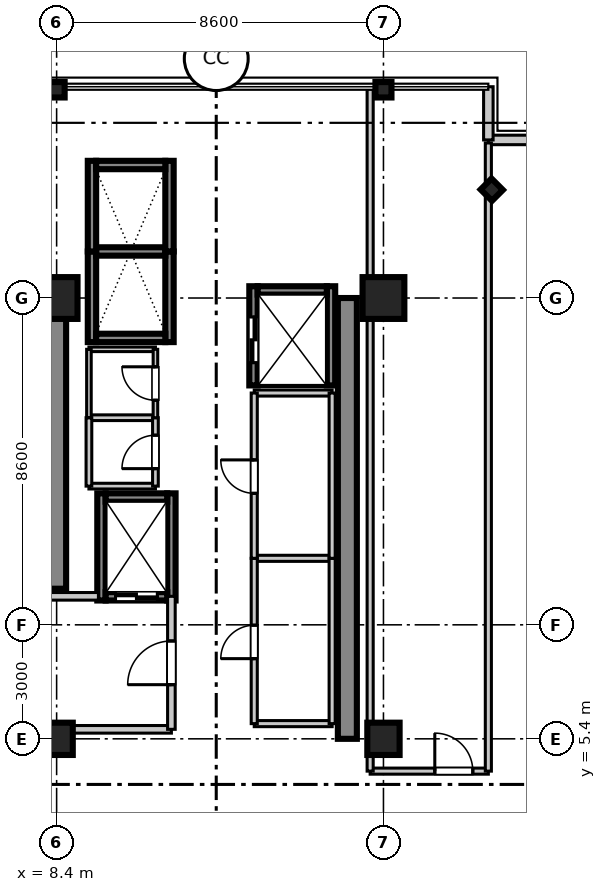
"""IFC4 building model, lengths in metres.
Left out: names, types, materials, properties, quantities, classifications, styles, units other than length and angle.
Written with IfcOpenShell. Run it as: python <this file> out.ifc"""

import sys

from ifc_helpers import new_model, si_unit, direction, frame, frame_2d, origin, origin_2d, place, context, subcontext, project, spatial, rectangle, i_section, extrude, source, transform, mapped, element, fill, save


model = new_model("IFC4")
c1 = context("Model", 3, precision=1e-05, world=origin(), true_north=direction((0.0, 1.0)))
c2 = subcontext(c1, "Body", "Model", "MODEL_VIEW")
j1 = project(units=[si_unit("LENGTHUNIT", "METRE"), si_unit("PLANEANGLEUNIT", "RADIAN")], contexts=[c1])
p1 = place(None, origin())
s1 = spatial("IfcSite", under=j1, at=p1, CompositionType="ELEMENT")
p2 = place(p1, origin())
s2 = spatial("IfcBuilding", under=s1, at=p2, CompositionType="ELEMENT")
p3 = place(p2, frame((0.0, 0.0, 163.6)))
s3 = spatial("IfcBuildingStorey", under=s2, at=p3, CompositionType="ELEMENT", Elevation=163.6)
m1 = source(origin(), c2, "Body", "SweptSolid", [
    extrude(rectangle(XDim=0.85, YDim=0.85, at=origin_2d()), origin(), (0.0, 0.0, 1.0), 3.605),
])
p4 = place(p3, frame((8.4, 5.4, 0.0), z_axis=(0.0, 0.0, 1.0), x_axis=(1.0, 0.0, 0.0)))
e1 = element("IfcColumn", 1, at=p4, inside=s3, PredefinedType="PILASTER", context=c2, shape_type="MappedRepresentation", body=[
    mapped(m1, transform((0.0, 0.0, 0.0), scale=1.0)),
])
m2 = source(origin(), c2, "Body", "SweptSolid", [
    extrude(rectangle(XDim=1.1, YDim=1.1, at=origin_2d()), origin(), (0.0, 0.0, 1.0), 3.605),
])
p5 = place(p3, frame((8.4, 17.0, 0.0), z_axis=(0.0, 0.0, 1.0), x_axis=(1.0, 0.0, 0.0)))
e2 = element("IfcColumn", 2, at=p5, inside=s3, PredefinedType="COLUMN", context=c2, shape_type="MappedRepresentation", body=[
    mapped(m2, transform((0.0, 0.0, 0.0), scale=1.0)),
])
p6 = place(p3, frame((17.0, 5.4, 0.0), z_axis=(0.0, 0.0, 1.0), x_axis=(1.0, 0.0, 0.0)))
e3 = element("IfcColumn", 3, at=p6, inside=s3, PredefinedType="PILASTER", context=c2, shape_type="MappedRepresentation", body=[
    mapped(m1, transform((0.0, 0.0, 0.0), scale=1.0)),
])
p7 = place(p3, frame((17.0, 17.0, 0.0), z_axis=(0.0, 0.0, 1.0), x_axis=(1.0, 0.0, 0.0)))
e4 = element("IfcColumn", 4, at=p7, inside=s3, PredefinedType="COLUMN", context=c2, shape_type="MappedRepresentation", body=[
    mapped(m2, transform((0.0, 0.0, 0.0), scale=1.0)),
])
m3 = source(origin(), c2, "Body", "SweptSolid", [
    extrude(i_section(OverallWidth=0.406, OverallDepth=0.422, WebThickness=0.019, FlangeThickness=0.03, at=origin_2d()), origin(), (0.0, 0.0, 1.0), 3.605),
])
for number, where, z_axis, x_axis in (
    (5, (8.4, 22.48, 0.0), (0.0, 0.0, 1.0), (0.0, 1.0, 0.0)),
    (6, (17.0, 22.48, 0.0), (0.0, 0.0, 1.0), (0.0, 1.0, 0.0)),
    (7, (19.85, 19.85, 0.0), (0.0, 0.0, 1.0), (0.707, 0.707, 0.0)),
):
    element("IfcColumn", number, at=place(p3, frame(where, z_axis=z_axis, x_axis=x_axis)), inside=s3, PredefinedType="COLUMN", context=c2, shape_type="MappedRepresentation", body=[
        mapped(m3, transform((0.0, 0.0, 0.0), scale=1.0)),
    ])
m4 = source(origin(), c2, "Body", "SweptSolid", [
    extrude(rectangle(XDim=7.65, YDim=0.5, at=frame_2d((3.825, 0.0))), origin(), (0.0, 0.0, 1.0), 3.39),
])
p8 = place(p3, frame((8.4, 9.35, 0.0), z_axis=(0.0, 0.0, 1.0), x_axis=(0.0, 1.0, 0.0)))
e8 = element("IfcWall", 8, at=p8, inside=s3, PredefinedType="SHEAR", context=c2, shape_type="MappedRepresentation", body=[
    mapped(m4, transform((0.0, 0.0, 0.0), scale=1.0)),
])
m5 = source(origin(), c2, "Body", "SweptSolid", [
    extrude(rectangle(XDim=11.6, YDim=0.5, at=frame_2d((5.8, 0.0))), origin(), (0.0, 0.0, 1.0), 3.39),
])
p9 = place(p3, frame((16.05, 5.4, 0.0), z_axis=(0.0, 0.0, 1.0), x_axis=(0.0, 1.0, 0.0)))
e9 = element("IfcWall", 9, at=p9, inside=s3, PredefinedType="SHEAR", context=c2, shape_type="MappedRepresentation", body=[
    mapped(m5, transform((0.0, 0.0, 0.0), scale=1.0)),
])
m6 = source(origin(), c2, "Body", "SweptSolid", [
    extrude(rectangle(XDim=2.385, YDim=0.22, at=frame_2d((1.192, 0.0))), origin(), (0.0, 0.0, 1.0), 3.39),
])
for number, where, z_axis, x_axis in (
    (10, (9.33, 15.84, 0.0), (0.0, 0.0, 1.0), (0.0, 1.0, 0.0)),
    (11, (11.37, 15.84, 0.0), (0.0, 0.0, 1.0), (0.0, 1.0, 0.0)),
):
    element("IfcWall", number, at=place(p3, frame(where, z_axis=z_axis, x_axis=x_axis)), inside=s3, PredefinedType="SHEAR", context=c2, shape_type="MappedRepresentation", body=[
        mapped(m6, transform((0.0, 0.0, 0.0), scale=1.0)),
    ])
m7 = source(origin(), c2, "Body", "SweptSolid", [
    extrude(rectangle(XDim=1.82, YDim=0.22, at=frame_2d((0.91, 0.0))), origin(), (0.0, 0.0, 1.0), 3.39),
])
p10 = place(p3, frame((9.44, 15.95, 0.0), z_axis=(0.0, 0.0, 1.0), x_axis=(1.0, 0.0, 0.0)))
e12 = element("IfcWall", 12, at=p10, inside=s3, PredefinedType="SHEAR", context=c2, shape_type="MappedRepresentation", body=[
    mapped(m7, transform((0.0, 0.0, 0.0), scale=1.0)),
])
m8 = source(origin(), c2, "Body", "SweptSolid", [
    extrude(rectangle(XDim=1.82, YDim=0.22, at=frame_2d((0.91, 0.0))), origin(), (0.0, 0.0, 1.0), 3.65),
])
p11 = place(p3, frame((9.44, 18.225, 0.0), z_axis=(0.0, 0.0, 1.0), x_axis=(1.0, 0.0, 0.0)))
e13 = element("IfcWall", 13, at=p11, inside=s3, PredefinedType="SHEAR", context=c2, shape_type="MappedRepresentation", body=[
    mapped(m8, transform((0.0, 0.0, 0.0), scale=1.0)),
])
for number, where, z_axis, x_axis in (
    (14, (9.33, 18.225, 0.0), (0.0, 0.0, 1.0), (0.0, 1.0, 0.0)),
    (15, (11.37, 18.225, 0.0), (0.0, 0.0, 1.0), (0.0, 1.0, 0.0)),
):
    element("IfcWall", number, at=place(p3, frame(where, z_axis=z_axis, x_axis=x_axis)), inside=s3, PredefinedType="SHEAR", context=c2, shape_type="MappedRepresentation", body=[
        mapped(m6, transform((0.0, 0.0, 0.0), scale=1.0)),
    ])
p12 = place(p3, frame((9.44, 20.5, 0.0), z_axis=(0.0, 0.0, 1.0), x_axis=(1.0, 0.0, 0.0)))
e16 = element("IfcWall", 16, at=p12, inside=s3, PredefinedType="SHEAR", context=c2, shape_type="MappedRepresentation", body=[
    mapped(m7, transform((0.0, 0.0, 0.0), scale=1.0)),
])
m9 = source(origin(), c2, "Body", "SweptSolid", [
    extrude(rectangle(XDim=2.82, YDim=0.22, at=frame_2d((1.41, 0.0))), origin(), (0.0, 0.0, 1.0), 3.39),
])
for number, where, z_axis, x_axis in (
    (17, (9.58, 9.04, 0.0), (0.0, 0.0, 1.0), (0.0, 1.0, 0.0)),
    (18, (11.42, 9.04, 0.0), (0.0, 0.0, 1.0), (0.0, 1.0, 0.0)),
):
    element("IfcWall", number, at=place(p3, frame(where, z_axis=z_axis, x_axis=x_axis)), inside=s3, PredefinedType="SHEAR", context=c2, shape_type="MappedRepresentation", body=[
        mapped(m9, transform((0.0, 0.0, 0.0), scale=1.0)),
    ])
m10 = source(origin(), c2, "Body", "SweptSolid", [
    extrude(rectangle(XDim=1.62, YDim=0.22, at=frame_2d((0.81, 0.0))), origin(), (0.0, 0.0, 1.0), 3.39),
])
p13 = place(p3, frame((9.69, 9.15, 0.0), z_axis=(0.0, 0.0, 1.0), x_axis=(1.0, 0.0, 0.0)))
e19 = element("IfcWall", 19, at=p13, inside=s3, PredefinedType="SHEAR", context=c2, shape_type="MappedRepresentation", body=[
    mapped(m10, transform((0.0, 0.0, 0.0), scale=1.0)),
])
p14 = place(p13, frame((0.26, 0.0, 0.0)))
e20 = element("IfcOpeningElement", 20, at=p14, cuts=e19, PredefinedType="OPENING", context=c2, shape_type="SweptSolid", body=[
    extrude(rectangle(XDim=1.1, YDim=2.2, at=frame_2d((0.55, 1.1))), frame((0.0, 0.12, 0.0), z_axis=(0.0, -1.0, 0.0), x_axis=(1.0, 0.0, 0.0)), (0.0, 0.0, 1.0), 0.24),
])
p15 = place(p3, frame((9.69, 11.75, 0.0), z_axis=(0.0, 0.0, 1.0), x_axis=(1.0, 0.0, 0.0)))
e21 = element("IfcWall", 21, at=p15, inside=s3, PredefinedType="SHEAR", context=c2, shape_type="MappedRepresentation", body=[
    mapped(m10, transform((0.0, 0.0, 0.0), scale=1.0)),
])
m11 = source(origin(), c2, "Body", "SweptSolid", [
    extrude(rectangle(XDim=2.61, YDim=0.22, at=frame_2d((1.305, 0.0))), origin(), (0.0, 0.0, 1.0), 3.39),
])
p16 = place(p3, frame((13.58, 14.7, 0.0), z_axis=(0.0, 0.0, 1.0), x_axis=(0.0, 1.0, 0.0)))
e22 = element("IfcWall", 22, at=p16, inside=s3, PredefinedType="SHEAR", context=c2, shape_type="MappedRepresentation", body=[
    mapped(m11, transform((0.0, 0.0, 0.0), scale=1.0)),
])
p17 = place(p16, frame((0.6, 0.0, 0.0)))
e23 = element("IfcOpeningElement", 23, at=p17, cuts=e22, PredefinedType="OPENING", context=c2, shape_type="SweptSolid", body=[
    extrude(rectangle(XDim=1.2, YDim=2.2, at=frame_2d((0.6, 1.1))), frame((0.0, 0.12, 0.0), z_axis=(0.0, -1.0, 0.0), x_axis=(1.0, 0.0, 0.0)), (0.0, 0.0, 1.0), 0.24),
])
p18 = place(p3, frame((15.62, 14.7, 0.0), z_axis=(0.0, 0.0, 1.0), x_axis=(0.0, 1.0, 0.0)))
e24 = element("IfcWall", 24, at=p18, inside=s3, PredefinedType="SHEAR", context=c2, shape_type="MappedRepresentation", body=[
    mapped(m11, transform((0.0, 0.0, 0.0), scale=1.0)),
])
p19 = place(p3, frame((13.69, 17.2, 0.0), z_axis=(0.0, 0.0, 1.0), x_axis=(1.0, 0.0, 0.0)))
e25 = element("IfcWall", 25, at=p19, inside=s3, PredefinedType="SHEAR", context=c2, shape_type="MappedRepresentation", body=[
    mapped(m7, transform((0.0, 0.0, 0.0), scale=1.0)),
])
m12 = source(origin(), c2, "Body", "SweptSolid", [
    extrude(rectangle(XDim=1.4, YDim=0.25, at=frame_2d((0.7, 0.0))), origin(), (0.0, 0.0, 1.0), 3.39),
])
p20 = place(p3, frame((19.76, 21.16, 0.0), z_axis=(0.0, 0.0, 1.0), x_axis=(1.0, 0.0, 0.0)))
e26 = element("IfcWall", 26, at=p20, inside=s3, PredefinedType="STANDARD", context=c2, shape_type="MappedRepresentation", body=[
    mapped(m12, transform((0.0, 0.0, 0.0), scale=1.0)),
])
m13 = source(origin(), c2, "Body", "SweptSolid", [
    extrude(rectangle(XDim=1.4, YDim=0.25, at=frame_2d((0.7, 0.0))), origin(), (0.0, 0.0, 1.0), 3.39),
])
p21 = place(p3, frame((19.76, 21.16, 0.0), z_axis=(0.0, 0.0, 1.0), x_axis=(0.0, 1.0, 0.0)))
e27 = element("IfcWall", 27, at=p21, inside=s3, PredefinedType="STANDARD", context=c2, shape_type="MappedRepresentation", body=[
    mapped(m13, transform((0.0, 0.0, 0.0), scale=1.0)),
])
m14 = source(origin(), c2, "Body", "SweptSolid", [
    extrude(rectangle(XDim=3.82, YDim=0.2, at=frame_2d((1.91, 0.0))), origin(), (0.0, 0.0, 1.0), 2.73),
])
p22 = place(p3, frame((7.6, 5.65, 0.0), z_axis=(0.0, 0.0, 1.0), x_axis=(1.0, 0.0, 0.0)))
e28 = element("IfcWall", 28, at=p22, inside=s3, PredefinedType="PARTITIONING", context=c2, shape_type="MappedRepresentation", body=[
    mapped(m14, transform((0.0, 0.0, 0.0), scale=1.0)),
])
m15 = source(origin(), c2, "Body", "SweptSolid", [
    extrude(rectangle(XDim=1.9, YDim=0.2, at=frame_2d((0.95, 0.0))), origin(), (0.0, 0.0, 1.0), 2.73),
])
p23 = place(p3, frame((7.6, 9.15, 0.0), z_axis=(0.0, 0.0, 1.0), x_axis=(1.0, 0.0, 0.0)))
e29 = element("IfcWall", 29, at=p23, inside=s3, PredefinedType="PARTITIONING", context=c2, shape_type="MappedRepresentation", body=[
    mapped(m15, transform((0.0, 0.0, 0.0), scale=1.0)),
])
m16 = source(origin(), c2, "Body", "SweptSolid", [
    extrude(rectangle(XDim=3.5, YDim=0.2, at=frame_2d((1.75, 0.0))), origin(), (0.0, 0.0, 1.0), 2.73),
])
p24 = place(p3, frame((11.42, 5.65, 0.0), z_axis=(0.0, 0.0, 1.0), x_axis=(0.0, 1.0, 0.0)))
e30 = element("IfcWall", 30, at=p24, inside=s3, PredefinedType="PARTITIONING", context=c2, shape_type="MappedRepresentation", body=[
    mapped(m16, transform((0.0, 0.0, 0.0), scale=1.0)),
])
p25 = place(p24, frame((1.175, 0.0, 0.0)))
e31 = element("IfcOpeningElement", 31, at=p25, cuts=e30, PredefinedType="OPENING", context=c2, shape_type="SweptSolid", body=[
    extrude(rectangle(XDim=1.15, YDim=2.15, at=frame_2d((0.575, 1.075))), frame((0.0, 0.11, 0.0), z_axis=(0.0, -1.0, 0.0), x_axis=(1.0, 0.0, 0.0)), (0.0, 0.0, 1.0), 0.22),
])
m17 = source(origin(), c2, "Body", "SweptSolid", [
    extrude(rectangle(XDim=1.75, YDim=0.15, at=frame_2d((0.875, 0.0))), origin(), (0.0, 0.0, 1.0), 2.73),
])
for number, where, z_axis, x_axis in (
    (32, (9.25, 12.05, 0.0), (0.0, 0.0, 1.0), (1.0, 0.0, 0.0)),
    (33, (9.25, 13.85, 0.0), (0.0, 0.0, 1.0), (1.0, 0.0, 0.0)),
):
    element("IfcWall", number, at=place(p3, frame(where, z_axis=z_axis, x_axis=x_axis)), inside=s3, PredefinedType="PARTITIONING", context=c2, shape_type="MappedRepresentation", body=[
        mapped(m17, transform((0.0, 0.0, 0.0), scale=1.0)),
    ])
m18 = source(origin(), c2, "Body", "SweptSolid", [
    extrude(rectangle(XDim=1.8, YDim=0.15, at=frame_2d((0.9, 0.0))), origin(), (0.0, 0.0, 1.0), 2.73),
])
p26 = place(p3, frame((9.25, 12.05, 0.0), z_axis=(0.0, 0.0, 1.0), x_axis=(0.0, 1.0, 0.0)))
e34 = element("IfcWall", 34, at=p26, inside=s3, PredefinedType="PARTITIONING", context=c2, shape_type="MappedRepresentation", body=[
    mapped(m18, transform((0.0, 0.0, 0.0), scale=1.0)),
])
p27 = place(p3, frame((11.0, 12.05, 0.0), z_axis=(0.0, 0.0, 1.0), x_axis=(0.0, 1.0, 0.0)))
e35 = element("IfcWall", 35, at=p27, inside=s3, PredefinedType="PARTITIONING", context=c2, shape_type="MappedRepresentation", body=[
    mapped(m18, transform((0.0, 0.0, 0.0), scale=1.0)),
])
p28 = place(p27, frame((0.46, 0.0, 0.0)))
e36 = element("IfcOpeningElement", 36, at=p28, cuts=e35, PredefinedType="OPENING", context=c2, shape_type="SweptSolid", body=[
    extrude(rectangle(XDim=0.88, YDim=2.1, at=frame_2d((0.44, 1.05))), frame((0.0, 0.085, 0.0), z_axis=(0.0, -1.0, 0.0), x_axis=(1.0, 0.0, 0.0)), (0.0, 0.0, 1.0), 0.17),
])
m19 = source(origin(), c2, "Body", "SweptSolid", [
    extrude(rectangle(XDim=1.75, YDim=0.12, at=frame_2d((0.875, 0.0))), origin(), (0.0, 0.0, 1.0), 2.73),
])
p29 = place(p3, frame((9.25, 15.65, 0.0), z_axis=(0.0, 0.0, 1.0), x_axis=(1.0, 0.0, 0.0)))
e37 = element("IfcWall", 37, at=p29, inside=s3, PredefinedType="PARTITIONING", context=c2, shape_type="MappedRepresentation", body=[
    mapped(m19, transform((0.0, 0.0, 0.0), scale=1.0)),
])
m20 = source(origin(), c2, "Body", "SweptSolid", [
    extrude(rectangle(XDim=1.8, YDim=0.12, at=frame_2d((0.9, 0.0))), origin(), (0.0, 0.0, 1.0), 2.73),
])
p30 = place(p3, frame((9.25, 13.85, 0.0), z_axis=(0.0, 0.0, 1.0), x_axis=(0.0, 1.0, 0.0)))
e38 = element("IfcWall", 38, at=p30, inside=s3, PredefinedType="PARTITIONING", context=c2, shape_type="MappedRepresentation", body=[
    mapped(m20, transform((0.0, 0.0, 0.0), scale=1.0)),
])
p31 = place(p3, frame((11.0, 13.85, 0.0), z_axis=(0.0, 0.0, 1.0), x_axis=(0.0, 1.0, 0.0)))
e39 = element("IfcWall", 39, at=p31, inside=s3, PredefinedType="PARTITIONING", context=c2, shape_type="MappedRepresentation", body=[
    mapped(m20, transform((0.0, 0.0, 0.0), scale=1.0)),
])
p32 = place(p31, frame((0.46, 0.0, 0.0)))
e40 = element("IfcOpeningElement", 40, at=p32, cuts=e39, PredefinedType="OPENING", context=c2, shape_type="SweptSolid", body=[
    extrude(rectangle(XDim=0.88, YDim=2.1, at=frame_2d((0.44, 1.05))), frame((0.0, 0.07, 0.0), z_axis=(0.0, -1.0, 0.0), x_axis=(1.0, 0.0, 0.0)), (0.0, 0.0, 1.0), 0.14),
])
m21 = source(origin(), c2, "Body", "SweptSolid", [
    extrude(rectangle(XDim=2.05, YDim=0.16, at=frame_2d((1.025, 0.0))), origin(), (0.0, 0.0, 1.0), 2.73),
])
for number, where, z_axis, x_axis in (
    (41, (13.6, 5.8, 0.0), (0.0, 0.0, 1.0), (1.0, 0.0, 0.0)),
    (42, (13.6, 10.15, 0.0), (0.0, 0.0, 1.0), (1.0, 0.0, 0.0)),
):
    element("IfcWall", number, at=place(p3, frame(where, z_axis=z_axis, x_axis=x_axis)), inside=s3, PredefinedType="PARTITIONING", context=c2, shape_type="MappedRepresentation", body=[
        mapped(m21, transform((0.0, 0.0, 0.0), scale=1.0)),
    ])
m22 = source(origin(), c2, "Body", "SweptSolid", [
    extrude(rectangle(XDim=4.35, YDim=0.16, at=frame_2d((2.175, 0.0))), origin(), (0.0, 0.0, 1.0), 2.73),
])
p33 = place(p3, frame((13.6, 5.8, 0.0), z_axis=(0.0, 0.0, 1.0), x_axis=(0.0, 1.0, 0.0)))
e43 = element("IfcWall", 43, at=p33, inside=s3, PredefinedType="PARTITIONING", context=c2, shape_type="MappedRepresentation", body=[
    mapped(m22, transform((0.0, 0.0, 0.0), scale=1.0)),
])
p34 = place(p33, frame((1.71, 0.0, 0.0)))
e44 = element("IfcOpeningElement", 44, at=p34, cuts=e43, PredefinedType="OPENING", context=c2, shape_type="SweptSolid", body=[
    extrude(rectangle(XDim=0.88, YDim=2.1, at=frame_2d((0.44, 1.05))), frame((0.0, 0.09, 0.0), z_axis=(0.0, -1.0, 0.0), x_axis=(1.0, 0.0, 0.0)), (0.0, 0.0, 1.0), 0.18),
])
p35 = place(p3, frame((15.65, 5.8, 0.0), z_axis=(0.0, 0.0, 1.0), x_axis=(0.0, 1.0, 0.0)))
e45 = element("IfcWall", 45, at=p35, inside=s3, PredefinedType="PARTITIONING", context=c2, shape_type="MappedRepresentation", body=[
    mapped(m22, transform((0.0, 0.0, 0.0), scale=1.0)),
])
p36 = place(p3, frame((13.6, 14.5, 0.0), z_axis=(0.0, 0.0, 1.0), x_axis=(1.0, 0.0, 0.0)))
e46 = element("IfcWall", 46, at=p36, inside=s3, PredefinedType="PARTITIONING", context=c2, shape_type="MappedRepresentation", body=[
    mapped(m21, transform((0.0, 0.0, 0.0), scale=1.0)),
])
m23 = source(origin(), c2, "Body", "SweptSolid", [
    extrude(rectangle(XDim=4.35, YDim=0.16, at=frame_2d((2.175, 0.0))), origin(), (0.0, 0.0, 1.0), 2.73),
])
p37 = place(p3, frame((13.6, 10.15, 0.0), z_axis=(0.0, 0.0, 1.0), x_axis=(0.0, 1.0, 0.0)))
e47 = element("IfcWall", 47, at=p37, inside=s3, PredefinedType="PARTITIONING", context=c2, shape_type="MappedRepresentation", body=[
    mapped(m23, transform((0.0, 0.0, 0.0), scale=1.0)),
])
p38 = place(p37, frame((1.71, 0.0, 0.0)))
e48 = element("IfcOpeningElement", 48, at=p38, cuts=e47, PredefinedType="OPENING", context=c2, shape_type="SweptSolid", body=[
    extrude(rectangle(XDim=0.88, YDim=2.1, at=frame_2d((0.44, 1.05))), frame((0.0, 0.09, 0.0), z_axis=(0.0, -1.0, 0.0), x_axis=(1.0, 0.0, 0.0)), (0.0, 0.0, 1.0), 0.18),
])
p39 = place(p3, frame((15.65, 10.15, 0.0), z_axis=(0.0, 0.0, 1.0), x_axis=(0.0, 1.0, 0.0)))
e49 = element("IfcWall", 49, at=p39, inside=s3, PredefinedType="PARTITIONING", context=c2, shape_type="MappedRepresentation", body=[
    mapped(m23, transform((0.0, 0.0, 0.0), scale=1.0)),
])
m24 = source(origin(), c2, "Body", "SweptSolid", [
    extrude(rectangle(XDim=3.11, YDim=0.16, at=frame_2d((1.555, 0.0))), origin(), (0.0, 0.0, 1.0), 2.73),
])
p40 = place(p3, frame((16.65, 4.55, 0.0), z_axis=(0.0, 0.0, 1.0), x_axis=(1.0, 0.0, 0.0)))
e50 = element("IfcWall", 50, at=p40, inside=s3, PredefinedType="PARTITIONING", context=c2, shape_type="MappedRepresentation", body=[
    mapped(m24, transform((0.0, 0.0, 0.0), scale=1.0)),
])
p41 = place(p40, frame((1.701, 0.0, 0.0)))
e51 = element("IfcOpeningElement", 51, at=p41, cuts=e50, PredefinedType="OPENING", context=c2, shape_type="SweptSolid", body=[
    extrude(rectangle(XDim=1.0, YDim=2.1, at=frame_2d((0.5, 1.05))), frame((0.0, 0.09, 0.0), z_axis=(0.0, -1.0, 0.0), x_axis=(1.0, 0.0, 0.0)), (0.0, 0.0, 1.0), 0.18),
])
m25 = source(origin(), c2, "Body", "SweptSolid", [
    extrude(rectangle(XDim=17.95, YDim=0.16, at=frame_2d((8.975, 0.0))), origin(), (0.0, 0.0, 1.0), 2.73),
])
p42 = place(p3, frame((16.65, 4.55, 0.0), z_axis=(0.0, 0.0, 1.0), x_axis=(0.0, 1.0, 0.0)))
e52 = element("IfcWall", 52, at=p42, inside=s3, PredefinedType="PARTITIONING", context=c2, shape_type="MappedRepresentation", body=[
    mapped(m25, transform((0.0, 0.0, 0.0), scale=1.0)),
])
m26 = source(origin(), c2, "Body", "SweptSolid", [
    extrude(rectangle(XDim=16.53, YDim=0.16, at=frame_2d((8.265, 0.0))), origin(), (0.0, 0.0, 1.0), 2.73),
])
p43 = place(p3, frame((19.76, 4.55, 0.0), z_axis=(0.0, 0.0, 1.0), x_axis=(0.0, 1.0, 0.0)))
e53 = element("IfcWall", 53, at=p43, inside=s3, PredefinedType="PARTITIONING", context=c2, shape_type="MappedRepresentation", body=[
    mapped(m26, transform((0.0, 0.0, 0.0), scale=1.0)),
])
m27 = source(origin(), c2, "Body", "SweptSolid", [
    extrude(rectangle(XDim=1.1, YDim=2.2, at=frame_2d((0.55, 1.1))), frame((0.0, 0.025, 0.0), z_axis=(0.0, -1.0, 0.0), x_axis=(1.0, 0.0, 0.0)), (0.0, 0.0, 1.0), 0.05),
])
p44 = place(p14, frame((1.1, 0.0, 0.0), z_axis=(0.0, 0.0, 1.0), x_axis=(-1.0, 0.0, 0.0)))
e54 = element("IfcDoor", 54, at=p44, inside=s3, OperationType="DOUBLE_DOOR_SLIDING", PredefinedType="DOOR", context=c2, shape_type="MappedRepresentation", body=[
    mapped(m27, transform((0.0, 0.0, 0.0), scale=1.0)),
])
fill(e20, e54)
m28 = source(origin(), c2, "Body", "SweptSolid", [
    extrude(rectangle(XDim=1.2, YDim=2.2, at=frame_2d((0.6, 1.1))), frame((0.0, 0.025, 0.0), z_axis=(0.0, -1.0, 0.0), x_axis=(1.0, 0.0, 0.0)), (0.0, 0.0, 1.0), 0.05),
])
p45 = place(p17, origin())
e55 = element("IfcDoor", 55, at=p45, inside=s3, OperationType="DOUBLE_DOOR_SLIDING", PredefinedType="DOOR", context=c2, shape_type="MappedRepresentation", body=[
    mapped(m28, transform((0.0, 0.0, 0.0), scale=1.0)),
])
fill(e23, e55)
m29 = source(origin(), c2, "Body", "SweptSolid", [
    extrude(rectangle(XDim=1.15, YDim=2.15, at=frame_2d((0.575, 1.075))), frame((0.0, 0.025, 0.0), z_axis=(0.0, -1.0, 0.0), x_axis=(1.0, 0.0, 0.0)), (0.0, 0.0, 1.0), 0.05),
])
p46 = place(p25, frame((1.15, 0.0, 0.0), z_axis=(0.0, 0.0, 1.0), x_axis=(-1.0, 0.0, 0.0)))
e56 = element("IfcDoor", 56, at=p46, inside=s3, OperationType="SINGLE_SWING_LEFT", PredefinedType="DOOR", context=c2, shape_type="MappedRepresentation", body=[
    mapped(m29, transform((0.0, 0.0, 0.0), scale=1.0)),
])
fill(e31, e56)
m30 = source(origin(), c2, "Body", "SweptSolid", [
    extrude(rectangle(XDim=0.88, YDim=2.1, at=frame_2d((0.44, 1.05))), frame((0.0, 0.025, 0.0), z_axis=(0.0, -1.0, 0.0), x_axis=(1.0, 0.0, 0.0)), (0.0, 0.0, 1.0), 0.05),
])
p47 = place(p28, origin())
e57 = element("IfcDoor", 57, at=p47, inside=s3, OperationType="SINGLE_SWING_LEFT", PredefinedType="DOOR", context=c2, shape_type="MappedRepresentation", body=[
    mapped(m30, transform((0.0, 0.0, 0.0), scale=1.0)),
])
fill(e36, e57)
p48 = place(p32, origin())
e58 = element("IfcDoor", 58, at=p48, inside=s3, OperationType="SINGLE_SWING_RIGHT", PredefinedType="DOOR", context=c2, shape_type="MappedRepresentation", body=[
    mapped(m30, transform((0.0, 0.0, 0.0), scale=1.0)),
])
fill(e40, e58)
p49 = place(p34, frame((0.88, 0.0, 0.0), z_axis=(0.0, 0.0, 1.0), x_axis=(-1.0, 0.0, 0.0)))
e59 = element("IfcDoor", 59, at=p49, inside=s3, OperationType="SINGLE_SWING_LEFT", PredefinedType="DOOR", context=c2, shape_type="MappedRepresentation", body=[
    mapped(m30, transform((0.0, 0.0, 0.0), scale=1.0)),
])
fill(e44, e59)
p50 = place(p38, frame((0.88, 0.0, 0.0), z_axis=(0.0, 0.0, 1.0), x_axis=(-1.0, 0.0, 0.0)))
e60 = element("IfcDoor", 60, at=p50, inside=s3, OperationType="SINGLE_SWING_RIGHT", PredefinedType="DOOR", context=c2, shape_type="MappedRepresentation", body=[
    mapped(m30, transform((0.0, 0.0, 0.0), scale=1.0)),
])
fill(e48, e60)
m31 = source(origin(), c2, "Body", "SweptSolid", [
    extrude(rectangle(XDim=1.0, YDim=2.1, at=frame_2d((0.5, 1.05))), frame((0.0, 0.025, 0.0), z_axis=(0.0, -1.0, 0.0), x_axis=(1.0, 0.0, 0.0)), (0.0, 0.0, 1.0), 0.05),
])
p51 = place(p41, origin())
e61 = element("IfcDoor", 61, at=p51, inside=s3, OperationType="SINGLE_SWING_LEFT", PredefinedType="DOOR", context=c2, shape_type="MappedRepresentation", body=[
    mapped(m31, transform((0.0, 0.0, 0.0), scale=1.0)),
])
fill(e51, e61)
save(model, sys.argv[1])
